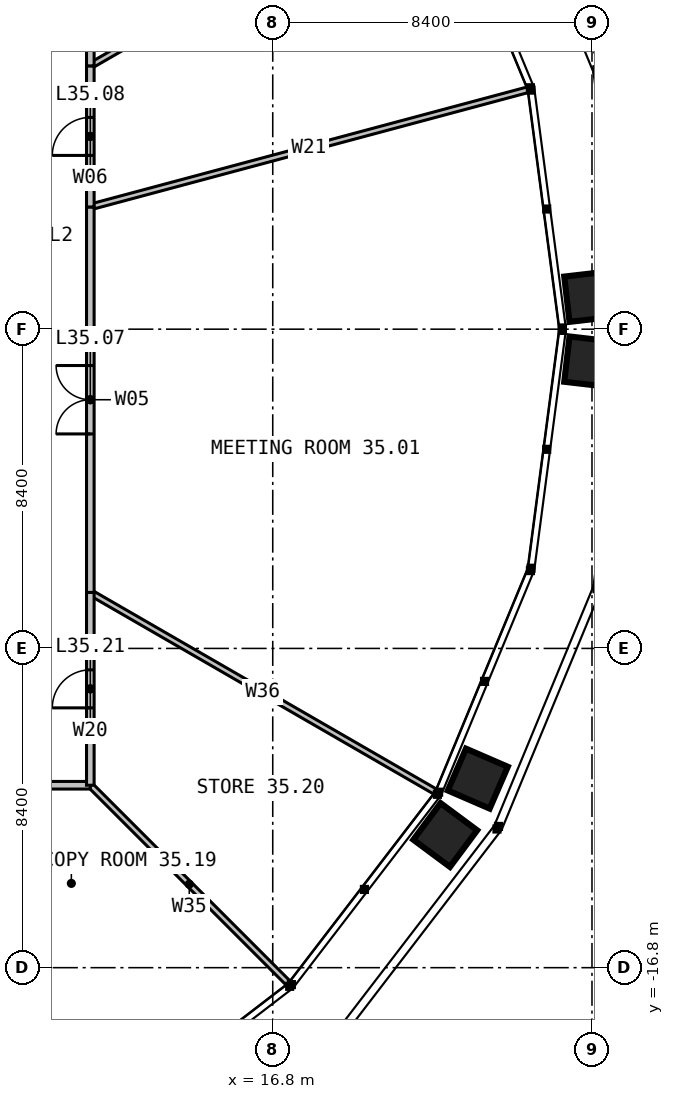
"""IFC4 building model, lengths in metres.
Left out: names, types, materials, properties, quantities, classifications, styles, units other than length and angle.
Written with IfcOpenShell. Run it as: python <this file> out.ifc"""

import sys

from ifc_helpers import new_model, si_unit, direction, frame, frame_2d, origin, place, context, subcontext, project, spatial, rectangle, extrude, element, fill, save


model = new_model("IFC4")
c1 = context("Model", 3, precision=1e-05, world=origin(), true_north=direction((0.0, 1.0)))
c2 = subcontext(c1, "Body", "Model", "MODEL_VIEW")
j1 = project(units=[si_unit("LENGTHUNIT", "METRE"), si_unit("PLANEANGLEUNIT", "RADIAN")], contexts=[c1])
p1 = place(None, origin())
s1 = spatial("IfcSite", under=j1, at=p1, CompositionType="ELEMENT")
p2 = place(p1, origin())
s2 = spatial("IfcBuilding", under=s1, at=p2, CompositionType="ELEMENT")
p3 = place(p2, frame((0.0, 0.0, 146.0)))
s3 = spatial("IfcBuildingStorey", under=s2, at=p3, CompositionType="ELEMENT", Elevation=146.0)
p4 = place(p3, frame((12.0, -6.928, 0.0), z_axis=(0.0, 0.0, 1.0), x_axis=(0.866029212144, -0.49999340367, 0.0)))
e1 = element("IfcWall", 1, at=p4, inside=s3, PredefinedType="PARTITIONING", context=c2, shape_type="SweptSolid", body=[
    extrude(rectangle(XDim=10.478, YDim=0.15, at=frame_2d((5.239, 0.0))), origin(), (0.0, 0.0, 1.0), 2.79),
])
p5 = place(p3, frame((12.0, 3.215, 0.0), z_axis=(0.0, 0.0, 1.0), x_axis=(0.965926367889, 0.258817023816, 0.0)))
e2 = element("IfcWall", 2, at=p5, inside=s3, PredefinedType="PARTITIONING", context=c2, shape_type="SweptSolid", body=[
    extrude(rectangle(XDim=11.911, YDim=0.15, at=frame_2d((5.956, 0.0))), origin(), (0.0, 0.0, 1.0), 2.79),
])
for number, where, z_axis, x_axis in (
    (3, (12.0, 6.928, 0.0), (0.0, 0.0, 1.0), (0.866, 0.5, 0.0)),
    (4, (6.928, -12.0, 0.0), (0.0, 0.0, 1.0), (0.5, -0.866, 0.0)),
):
    element("IfcWall", number, at=place(p3, frame(where, z_axis=z_axis, x_axis=x_axis)), inside=s3, PredefinedType="PARTITIONING", context=c2, shape_type="SweptSolid", body=[
        extrude(rectangle(XDim=10.478, YDim=0.15, at=frame_2d((5.239, 0.0))), origin(), (0.0, 0.0, 1.0), 2.79),
    ])
p6 = place(p3, frame((12.0, -12.0, 0.0), z_axis=(0.0, 0.0, 1.0), x_axis=(0.707106781187, -0.707106781187, 0.0)))
e5 = element("IfcWall", 5, at=p6, inside=s3, PredefinedType="PARTITIONING", context=c2, shape_type="SweptSolid", body=[
    extrude(rectangle(XDim=7.364, YDim=0.15, at=frame_2d((3.682, 0.0))), origin(), (0.0, 0.0, 1.0), 2.79),
])
p7 = place(p3, frame((12.0, -6.928, 0.0), z_axis=(0.0, 0.0, 1.0), x_axis=(0.0, 1.0, 0.0)))
e6 = element("IfcWall", 6, at=p7, inside=s3, PredefinedType="PARTITIONING", context=c2, shape_type="SweptSolid", body=[
    extrude(rectangle(XDim=10.144, YDim=0.2, at=frame_2d((5.072, 0.0))), origin(), (0.0, 0.0, 1.0), 3.8),
])
p8 = place(p7, frame((4.172, 0.0, 0.0)))
e7 = element("IfcOpeningElement", 7, at=p8, cuts=e6, PredefinedType="OPENING", context=c2, shape_type="SweptSolid", body=[
    extrude(rectangle(XDim=1.8, YDim=2.2, at=frame_2d((0.9, 1.1))), frame((0.0, 0.11, 0.0), z_axis=(0.0, -1.0, 0.0), x_axis=(1.0, 0.0, 0.0)), (0.0, 0.0, 1.0), 0.22),
])
p9 = place(p3, frame((12.0, 3.215, 0.0), z_axis=(0.0, 0.0, 1.0), x_axis=(0.0, 1.0, 0.0)))
e8 = element("IfcWall", 8, at=p9, inside=s3, PredefinedType="PARTITIONING", context=c2, shape_type="SweptSolid", body=[
    extrude(rectangle(XDim=3.713, YDim=0.2, at=frame_2d((1.856, 0.0))), origin(), (0.0, 0.0, 1.0), 3.8),
])
p10 = place(p9, frame((1.356, 0.0, 0.0)))
e9 = element("IfcOpeningElement", 9, at=p10, cuts=e8, PredefinedType="OPENING", context=c2, shape_type="SweptSolid", body=[
    extrude(rectangle(XDim=1.0, YDim=2.2, at=frame_2d((0.5, 1.1))), frame((0.0, 0.11, 0.0), z_axis=(0.0, -1.0, 0.0), x_axis=(1.0, 0.0, 0.0)), (0.0, 0.0, 1.0), 0.22),
])
p11 = place(p3, frame((12.0, 6.928, 0.0), z_axis=(0.0, 0.0, 1.0), x_axis=(0.0, 1.0, 0.0)))
e10 = element("IfcWall", 10, at=p11, inside=s3, PredefinedType="PARTITIONING", context=c2, shape_type="SweptSolid", body=[
    extrude(rectangle(XDim=2.28, YDim=0.2, at=frame_2d((1.14, 0.0))), origin(), (0.0, 0.0, 1.0), 3.8),
])
p12 = place(p11, frame((0.64, 0.0, 0.0)))
e11 = element("IfcOpeningElement", 11, at=p12, cuts=e10, PredefinedType="OPENING", context=c2, shape_type="SweptSolid", body=[
    extrude(rectangle(XDim=1.0, YDim=2.2, at=frame_2d((0.5, 1.1))), frame((0.0, 0.11, 0.0), z_axis=(0.0, -1.0, 0.0), x_axis=(1.0, 0.0, 0.0)), (0.0, 0.0, 1.0), 0.22),
])
p13 = place(p3, frame((6.928, -12.0, 0.0), z_axis=(0.0, 0.0, 1.0), x_axis=(1.0, 0.0, 0.0)))
e12 = element("IfcWall", 12, at=p13, inside=s3, PredefinedType="PARTITIONING", context=c2, shape_type="SweptSolid", body=[
    extrude(rectangle(XDim=5.072, YDim=0.2, at=frame_2d((2.536, 0.0))), origin(), (0.0, 0.0, 1.0), 3.8),
])
p14 = place(p13, frame((2.036, 0.0, 0.0)))
e13 = element("IfcOpeningElement", 13, at=p14, cuts=e12, PredefinedType="OPENING", context=c2, shape_type="SweptSolid", body=[
    extrude(rectangle(XDim=1.0, YDim=2.2, at=frame_2d((0.5, 1.1))), frame((0.0, 0.11, 0.0), z_axis=(0.0, -1.0, 0.0), x_axis=(1.0, 0.0, 0.0)), (0.0, 0.0, 1.0), 0.22),
])
p15 = place(p3, frame((12.0, -12.0, 0.0), z_axis=(0.0, 0.0, 1.0), x_axis=(0.0, 1.0, 0.0)))
e14 = element("IfcWall", 14, at=p15, inside=s3, PredefinedType="PARTITIONING", context=c2, shape_type="SweptSolid", body=[
    extrude(rectangle(XDim=5.072, YDim=0.2, at=frame_2d((2.536, 0.0))), origin(), (0.0, 0.0, 1.0), 3.8),
])
p16 = place(p15, frame((2.036, 0.0, 0.0)))
e15 = element("IfcOpeningElement", 15, at=p16, cuts=e14, PredefinedType="OPENING", context=c2, shape_type="SweptSolid", body=[
    extrude(rectangle(XDim=1.0, YDim=2.2, at=frame_2d((0.5, 1.1))), frame((0.0, 0.11, 0.0), z_axis=(0.0, -1.0, 0.0), x_axis=(1.0, 0.0, 0.0)), (0.0, 0.0, 1.0), 0.22),
])
p17 = place(p8, origin())
e16 = element("IfcDoor", 16, at=p17, inside=s3, OperationType="DOUBLE_DOOR_SINGLE_SWING", PredefinedType="DOOR", context=c2, shape_type="SweptSolid", body=[
    extrude(rectangle(XDim=1.8, YDim=2.2, at=frame_2d((0.9, 1.1))), frame((0.0, 0.025, 0.0), z_axis=(0.0, -1.0, 0.0), x_axis=(1.0, 0.0, 0.0)), (0.0, 0.0, 1.0), 0.05),
])
fill(e7, e16)
p18 = place(p10, origin())
e17 = element("IfcDoor", 17, at=p18, inside=s3, OperationType="SINGLE_SWING_LEFT", PredefinedType="DOOR", context=c2, shape_type="SweptSolid", body=[
    extrude(rectangle(XDim=1.0, YDim=2.2, at=frame_2d((0.5, 1.1))), frame((0.0, 0.025, 0.0), z_axis=(0.0, -1.0, 0.0), x_axis=(1.0, 0.0, 0.0)), (0.0, 0.0, 1.0), 0.05),
])
fill(e9, e17)
p19 = place(p16, origin())
e18 = element("IfcDoor", 18, at=p19, inside=s3, OperationType="SINGLE_SWING_LEFT", PredefinedType="DOOR", context=c2, shape_type="SweptSolid", body=[
    extrude(rectangle(XDim=1.0, YDim=2.2, at=frame_2d((0.5, 1.1))), frame((0.0, 0.025, 0.0), z_axis=(0.0, -1.0, 0.0), x_axis=(1.0, 0.0, 0.0)), (0.0, 0.0, 1.0), 0.05),
])
fill(e15, e18)
save(model, sys.argv[1])
